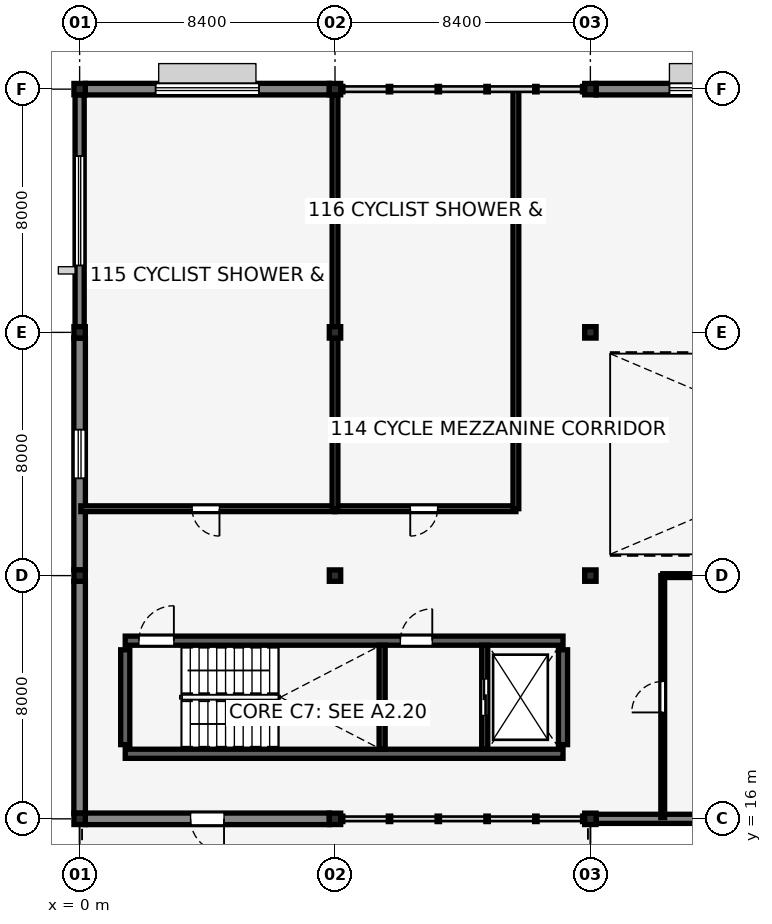
"""IFC4 building model, lengths in metres.
Left out: names, types, materials, properties, quantities, classifications, styles, units other than length and angle.
Written with IfcOpenShell. Run it as: python <this file> out.ifc"""

import sys

from ifc_helpers import new_model, si_unit, direction, frame, frame_2d, origin, origin_2d, place, context, subcontext, project, spatial, rectangle, i_section, extrude, element, fill, save


model = new_model("IFC4")
c1 = context("Model", 3, precision=1e-05, world=origin(), true_north=direction((0.0, 1.0)))
c2 = subcontext(c1, "Body", "Model", "MODEL_VIEW")
j1 = project(units=[si_unit("LENGTHUNIT", "METRE"), si_unit("PLANEANGLEUNIT", "RADIAN")], contexts=[c1])
p1 = place(None, origin())
s1 = spatial("IfcSite", under=j1, at=p1, CompositionType="ELEMENT")
p2 = place(p1, origin())
s2 = spatial("IfcBuilding", under=s1, at=p2, CompositionType="ELEMENT")
p3 = place(p2, frame((0.0, 0.0, 5.44)))
s3 = spatial("IfcBuildingStorey", under=s2, at=p3, CompositionType="ELEMENT", Elevation=5.44)
p4 = place(p3, frame((1.5, 18.14, 0.0), z_axis=(0.0, 0.0, 1.0), x_axis=(1.0, 0.0, 0.0)))
e1 = element("IfcWall", 1, at=p4, inside=s3, PredefinedType="SHEAR", context=c2, shape_type="SweptSolid", body=[
    extrude(rectangle(XDim=14.4, YDim=0.3, at=frame_2d((7.2, 0.0))), origin(), (0.0, 0.0, 1.0), 3.8),
])
p5 = place(p3, frame((1.5, 21.86, 0.0), z_axis=(0.0, 0.0, 1.0), x_axis=(1.0, 0.0, 0.0)))
e2 = element("IfcWall", 2, at=p5, inside=s3, PredefinedType="SHEAR", context=c2, shape_type="SweptSolid", body=[
    extrude(rectangle(XDim=14.4, YDim=0.3, at=frame_2d((7.2, 0.0))), origin(), (0.0, 0.0, 1.0), 3.8),
])
p6 = place(p5, frame((0.45, 0.0, 0.0), z_axis=(0.0, 0.0, 1.0), x_axis=(1.0, 0.0, 0.0)))
e3 = element("IfcOpeningElement", 3, at=p6, cuts=e2, PredefinedType="OPENING", context=c2, shape_type="SweptSolid", body=[
    extrude(rectangle(XDim=1.15, YDim=2.15, at=frame_2d((0.575, 1.075))), frame((0.0, 0.16, 0.0), z_axis=(0.0, -1.0, 0.0), x_axis=(1.0, 0.0, 0.0)), (0.0, 0.0, 1.0), 0.32),
])
p7 = place(p5, frame((9.05, 0.0, 0.0), z_axis=(0.0, 0.0, 1.0), x_axis=(1.0, 0.0, 0.0)))
e4 = element("IfcOpeningElement", 4, at=p7, cuts=e2, PredefinedType="OPENING", context=c2, shape_type="SweptSolid", body=[
    extrude(rectangle(XDim=1.05, YDim=2.15, at=frame_2d((0.525, 1.075))), frame((0.0, 0.16, 0.0), z_axis=(0.0, -1.0, 0.0), x_axis=(1.0, 0.0, 0.0)), (0.0, 0.0, 1.0), 0.32),
])
for number, where, z_axis, x_axis in (
    (5, (1.5, 18.44, 0.0), (0.0, 0.0, 1.0), (0.0, 1.0, 0.0)),
    (6, (15.9, 18.44, 0.0), (0.0, 0.0, 1.0), (0.0, 1.0, 0.0)),
):
    element("IfcWall", number, at=place(p3, frame(where, z_axis=z_axis, x_axis=x_axis)), inside=s3, PredefinedType="SHEAR", context=c2, shape_type="SweptSolid", body=[
        extrude(rectangle(XDim=3.12, YDim=0.3, at=frame_2d((1.56, 0.0))), origin(), (0.0, 0.0, 1.0), 3.8),
    ])
for number, where, z_axis, x_axis in (
    (7, (0.0, 16.0, 0.0), (0.0, 0.0, 1.0), (1.0, 0.0, 0.0)),
    (8, (0.0, 24.0, 0.0), (0.0, 0.0, 1.0), (1.0, 0.0, 0.0)),
    (9, (0.0, 32.0, 0.0), (0.0, 0.0, 1.0), (1.0, 0.0, 0.0)),
    (10, (0.0, 40.0, 0.0), (0.0, 0.0, 1.0), (1.0, 0.0, 0.0)),
    (11, (8.4, 16.0, 0.0), (0.0, 0.0, 1.0), (1.0, 0.0, 0.0)),
    (12, (8.4, 24.0, 0.0), (0.0, 0.0, 1.0), (1.0, 0.0, 0.0)),
    (13, (8.4, 32.0, 0.0), (0.0, 0.0, 1.0), (1.0, 0.0, 0.0)),
    (14, (8.4, 40.0, 0.0), (0.0, 0.0, 1.0), (1.0, 0.0, 0.0)),
    (15, (16.8, 16.0, 0.0), (0.0, 0.0, 1.0), (1.0, 0.0, 0.0)),
    (16, (16.8, 24.0, 0.0), (0.0, 0.0, 1.0), (1.0, 0.0, 0.0)),
    (17, (16.8, 32.0, 0.0), (0.0, 0.0, 1.0), (1.0, 0.0, 0.0)),
    (18, (16.8, 40.0, 0.0), (0.0, 0.0, 1.0), (1.0, 0.0, 0.0)),
):
    element("IfcColumn", number, at=place(p3, frame(where, z_axis=z_axis, x_axis=x_axis)), inside=s3, PredefinedType="COLUMN", context=c2, shape_type="SweptSolid", body=[
        extrude(i_section(OverallWidth=0.375, OverallDepth=0.375, WebThickness=0.017, FlangeThickness=0.027, FilletRadius=0.015, at=origin_2d()), origin(), (0.0, 0.0, 1.0), 3.8),
    ])
p8 = place(p3, frame((0.187, 16.0, 0.0), z_axis=(0.0, 0.0, 1.0), x_axis=(1.0, 0.0, 0.0)))
e19 = element("IfcWall", 19, at=p8, inside=s3, PredefinedType="SOLIDWALL", context=c2, shape_type="SweptSolid", body=[
    extrude(rectangle(XDim=8.025, YDim=0.38, at=frame_2d((4.013, 0.0))), origin(), (0.0, 0.0, 1.0), 3.45),
])
p9 = place(p8, frame((4.563, 0.0, 0.0), z_axis=(0.0, 0.0, 1.0), x_axis=(-1.0, 0.0, 0.0)))
e20 = element("IfcOpeningElement", 20, at=p9, cuts=e19, PredefinedType="OPENING", context=c2, shape_type="SweptSolid", body=[
    extrude(rectangle(XDim=1.1, YDim=2.15, at=frame_2d((0.55, 1.075))), frame((0.0, 0.2, 0.0), z_axis=(0.0, -1.0, 0.0), x_axis=(1.0, 0.0, 0.0)), (0.0, 0.0, 1.0), 0.4),
])
p10 = place(p3, frame((16.987, 16.0, 0.0), z_axis=(0.0, 0.0, 1.0), x_axis=(1.0, 0.0, 0.0)))
e21 = element("IfcWall", 21, at=p10, inside=s3, PredefinedType="SOLIDWALL", context=c2, shape_type="SweptSolid", body=[
    extrude(rectangle(XDim=8.025, YDim=0.3, at=frame_2d((4.013, 0.0))), origin(), (0.0, 0.0, 1.0), 3.45),
])
p11 = place(p10, frame((3.613, 0.0, 0.65), z_axis=(0.0, 0.0, 1.0), x_axis=(1.0, 0.0, 0.0)))
e22 = element("IfcOpeningElement", 22, at=p11, cuts=e21, PredefinedType="OPENING", context=c2, shape_type="SweptSolid", body=[
    extrude(rectangle(XDim=0.8, YDim=1.85, at=frame_2d((0.4, 0.925))), frame((0.0, 0.16, 0.0), z_axis=(0.0, -1.0, 0.0), x_axis=(1.0, 0.0, 0.0)), (0.0, 0.0, 1.0), 0.32),
])
p12 = place(p3, frame((0.0, 16.187, 0.0), z_axis=(0.0, 0.0, 1.0), x_axis=(0.0, 1.0, 0.0)))
e23 = element("IfcWall", 23, at=p12, inside=s3, PredefinedType="SOLIDWALL", context=c2, shape_type="SweptSolid", body=[
    extrude(rectangle(XDim=7.625, YDim=0.38, at=frame_2d((3.813, 0.0))), origin(), (0.0, 0.0, 1.0), 3.5),
])
p13 = place(p3, frame((0.0, 24.187, 0.0), z_axis=(0.0, 0.0, 1.0), x_axis=(0.0, 1.0, 0.0)))
e24 = element("IfcWall", 24, at=p13, inside=s3, PredefinedType="SOLIDWALL", context=c2, shape_type="SweptSolid", body=[
    extrude(rectangle(XDim=7.625, YDim=0.38, at=frame_2d((3.813, 0.0))), origin(), (0.0, 0.0, 1.0), 3.442),
])
p14 = place(p13, frame((3.013, 0.0, 0.9), z_axis=(0.0, 0.0, 1.0), x_axis=(1.0, 0.0, 0.0)))
e25 = element("IfcOpeningElement", 25, at=p14, cuts=e24, PredefinedType="OPENING", context=c2, shape_type="SweptSolid", body=[
    extrude(rectangle(XDim=1.6, YDim=1.2, at=frame_2d((0.8, 0.6))), frame((0.0, 0.2, 0.0), z_axis=(0.0, -1.0, 0.0), x_axis=(1.0, 0.0, 0.0)), (0.0, 0.0, 1.0), 0.4),
])
p15 = place(p3, frame((0.0, 32.187, 0.0), z_axis=(0.0, 0.0, 1.0), x_axis=(0.0, 1.0, 0.0)))
e26 = element("IfcWall", 26, at=p15, inside=s3, PredefinedType="SOLIDWALL", context=c2, shape_type="SweptSolid", body=[
    extrude(rectangle(XDim=7.625, YDim=0.3, at=frame_2d((3.813, 0.0))), origin(), (0.0, 0.0, 1.0), 3.442),
])
p16 = place(p15, frame((2.013, 0.0, 0.9), z_axis=(0.0, 0.0, 1.0), x_axis=(1.0, 0.0, 0.0)))
e27 = element("IfcOpeningElement", 27, at=p16, cuts=e26, PredefinedType="OPENING", context=c2, shape_type="SweptSolid", body=[
    extrude(rectangle(XDim=3.6, YDim=1.8, at=frame_2d((1.8, 0.9))), frame((0.0, 0.16, 0.0), z_axis=(0.0, -1.0, 0.0), x_axis=(1.0, 0.0, 0.0)), (0.0, 0.0, 1.0), 0.32),
])
p17 = place(p3, frame((0.187, 40.0, 0.0), z_axis=(0.0, 0.0, 1.0), x_axis=(1.0, 0.0, 0.0)))
e28 = element("IfcWall", 28, at=p17, inside=s3, PredefinedType="SOLIDWALL", context=c2, shape_type="SweptSolid", body=[
    extrude(rectangle(XDim=8.025, YDim=0.38, at=frame_2d((4.013, 0.0))), origin(), (0.0, 0.0, 1.0), 3.45),
])
p18 = place(p17, frame((2.313, 0.0, 0.9), z_axis=(0.0, 0.0, 1.0), x_axis=(1.0, 0.0, 0.0)))
e29 = element("IfcOpeningElement", 29, at=p18, cuts=e28, PredefinedType="OPENING", context=c2, shape_type="SweptSolid", body=[
    extrude(rectangle(XDim=3.4, YDim=1.7, at=frame_2d((1.7, 0.85))), frame((0.0, 0.2, 0.0), z_axis=(0.0, -1.0, 0.0), x_axis=(1.0, 0.0, 0.0)), (0.0, 0.0, 1.0), 0.4),
])
p19 = place(p3, frame((16.987, 40.0, 0.0), z_axis=(0.0, 0.0, 1.0), x_axis=(1.0, 0.0, 0.0)))
e30 = element("IfcWall", 30, at=p19, inside=s3, PredefinedType="SOLIDWALL", context=c2, shape_type="SweptSolid", body=[
    extrude(rectangle(XDim=8.025, YDim=0.38, at=frame_2d((4.013, 0.0))), origin(), (0.0, 0.0, 1.0), 3.45),
])
p20 = place(p19, frame((2.413, 0.0, 0.9), z_axis=(0.0, 0.0, 1.0), x_axis=(1.0, 0.0, 0.0)))
e31 = element("IfcOpeningElement", 31, at=p20, cuts=e30, PredefinedType="OPENING", context=c2, shape_type="SweptSolid", body=[
    extrude(rectangle(XDim=3.2, YDim=1.65, at=frame_2d((1.6, 0.825))), frame((0.0, 0.2, 0.0), z_axis=(0.0, -1.0, 0.0), x_axis=(1.0, 0.0, 0.0)), (0.0, 0.0, 1.0), 0.4),
])
p21 = place(p3, frame((9.95, 18.29, 0.0), z_axis=(0.0, 0.0, 1.0), x_axis=(0.0, 1.0, 0.0)))
e32 = element("IfcWall", 32, at=p21, inside=s3, PredefinedType="SHEAR", context=c2, shape_type="SweptSolid", body=[
    extrude(rectangle(XDim=3.42, YDim=0.2, at=frame_2d((1.71, 0.0))), origin(), (0.0, 0.0, 1.0), 3.8),
])
p22 = place(p3, frame((13.325, 18.29, 0.0), z_axis=(0.0, 0.0, 1.0), x_axis=(0.0, 1.0, 0.0)))
e33 = element("IfcWall", 33, at=p22, inside=s3, PredefinedType="SHEAR", context=c2, shape_type="SweptSolid", body=[
    extrude(rectangle(XDim=3.42, YDim=0.2, at=frame_2d((1.71, 0.0))), origin(), (0.0, 0.0, 1.0), 3.8),
])
p23 = place(p22, frame((1.11, 0.0, 0.0), z_axis=(0.0, 0.0, 1.0), x_axis=(1.0, 0.0, 0.0)))
e34 = element("IfcOpeningElement", 34, at=p23, cuts=e33, PredefinedType="OPENING", context=c2, shape_type="SweptSolid", body=[
    extrude(rectangle(XDim=1.2, YDim=2.2, at=frame_2d((0.6, 1.1))), frame((0.0, 0.11, 0.0), z_axis=(0.0, -1.0, 0.0), x_axis=(1.0, 0.0, 0.0)), (0.0, 0.0, 1.0), 0.22),
])
p24 = place(p3, frame((0.04, 26.2, 0.0), z_axis=(0.0, 0.0, 1.0), x_axis=(1.0, 0.0, 0.0)))
e35 = element("IfcWall", 35, at=p24, inside=s3, PredefinedType="PLUMBINGWALL", context=c2, shape_type="SweptSolid", body=[
    extrude(rectangle(XDim=8.36, YDim=0.19, at=frame_2d((4.18, 0.0))), origin(), (0.0, 0.0, 1.0), 3.8),
])
p25 = place(p24, frame((4.56, 0.0, 0.0), z_axis=(0.0, 0.0, 1.0), x_axis=(-1.0, 0.0, 0.0)))
e36 = element("IfcOpeningElement", 36, at=p25, cuts=e35, PredefinedType="OPENING", context=c2, shape_type="SweptSolid", body=[
    extrude(rectangle(XDim=0.9, YDim=2.15, at=frame_2d((0.45, 1.075))), frame((0.0, 0.105, 0.0), z_axis=(0.0, -1.0, 0.0), x_axis=(1.0, 0.0, 0.0)), (0.0, 0.0, 1.0), 0.21),
])
p26 = place(p3, frame((8.4, 26.2, 0.0), z_axis=(0.0, 0.0, 1.0), x_axis=(1.0, 0.0, 0.0)))
e37 = element("IfcWall", 37, at=p26, inside=s3, PredefinedType="PLUMBINGWALL", context=c2, shape_type="SweptSolid", body=[
    extrude(rectangle(XDim=5.95, YDim=0.19, at=frame_2d((2.975, 0.0))), origin(), (0.0, 0.0, 1.0), 3.8),
])
p27 = place(p26, frame((3.375, 0.0, 0.0), z_axis=(0.0, 0.0, 1.0), x_axis=(-1.0, 0.0, 0.0)))
e38 = element("IfcOpeningElement", 38, at=p27, cuts=e37, PredefinedType="OPENING", context=c2, shape_type="SweptSolid", body=[
    extrude(rectangle(XDim=0.9, YDim=2.15, at=frame_2d((0.45, 1.075))), frame((0.0, 0.105, 0.0), z_axis=(0.0, -1.0, 0.0), x_axis=(1.0, 0.0, 0.0)), (0.0, 0.0, 1.0), 0.21),
])
p28 = place(p3, frame((19.18, 16.04, 0.0), z_axis=(0.0, 0.0, 1.0), x_axis=(0.0, 1.0, 0.0)))
e39 = element("IfcWall", 39, at=p28, inside=s3, PredefinedType="PARTITIONING", context=c2, shape_type="SweptSolid", body=[
    extrude(rectangle(XDim=7.96, YDim=0.125, at=frame_2d((3.98, 0.0))), origin(), (0.0, 0.0, 1.0), 3.442),
])
p29 = place(p28, frame((3.46, 0.0, 0.0), z_axis=(0.0, 0.0, 1.0), x_axis=(1.0, 0.0, 0.0)))
e40 = element("IfcOpeningElement", 40, at=p29, cuts=e39, PredefinedType="OPENING", context=c2, shape_type="SweptSolid", body=[
    extrude(rectangle(XDim=1.02, YDim=2.16, at=frame_2d((0.51, 1.08))), frame((0.0, 0.073, 0.0), z_axis=(0.0, -1.0, 0.0), x_axis=(1.0, 0.0, 0.0)), (0.0, 0.0, 1.0), 0.145),
])
p30 = place(p3, frame((8.4, 26.2, 0.0), z_axis=(0.0, 0.0, 1.0), x_axis=(0.0, 1.0, 0.0)))
e41 = element("IfcWall", 41, at=p30, inside=s3, PredefinedType="PLUMBINGWALL", context=c2, shape_type="SweptSolid", body=[
    extrude(rectangle(XDim=5.623, YDim=0.19, at=frame_2d((2.812, 0.0))), origin(), (0.0, 0.0, 1.0), 3.337),
])
p31 = place(p3, frame((8.4, 32.177, 0.0), z_axis=(0.0, 0.0, 1.0), x_axis=(0.0, 1.0, 0.0)))
e42 = element("IfcWall", 42, at=p31, inside=s3, PredefinedType="PLUMBINGWALL", context=c2, shape_type="SweptSolid", body=[
    extrude(rectangle(XDim=7.646, YDim=0.19, at=frame_2d((3.823, 0.0))), origin(), (0.0, 0.0, 1.0), 3.337),
])
p32 = place(p3, frame((14.35, 26.2, 0.0), z_axis=(0.0, 0.0, 1.0), x_axis=(0.0, 1.0, 0.0)))
e43 = element("IfcWall", 43, at=p32, inside=s3, PredefinedType="PLUMBINGWALL", context=c2, shape_type="SweptSolid", body=[
    extrude(rectangle(XDim=13.76, YDim=0.19, at=frame_2d((6.88, 0.0))), origin(), (0.0, 0.0, 1.0), 3.442),
])
p33 = place(p3, frame((19.18, 24.0, 0.0), z_axis=(0.0, 0.0, 1.0), x_axis=(1.0, 0.0, 0.0)))
e44 = element("IfcWall", 44, at=p33, inside=s3, PredefinedType="PARTITIONING", context=c2, shape_type="SweptSolid", body=[
    extrude(rectangle(XDim=5.843, YDim=0.125, at=frame_2d((2.921, 0.0))), origin(), (0.0, 0.0, 1.0), 3.26),
])
p34 = place(p9, origin())
e45 = element("IfcDoor", 45, at=p34, inside=s3, OperationType="SINGLE_SWING_LEFT", PredefinedType="DOOR", context=c2, shape_type="SweptSolid", body=[
    extrude(rectangle(XDim=1.1, YDim=2.15, at=frame_2d((0.55, 1.075))), frame((0.0, 0.025, 0.0), z_axis=(0.0, -1.0, 0.0), x_axis=(1.0, 0.0, 0.0)), (0.0, 0.0, 1.0), 0.05),
])
fill(e20, e45)
p35 = place(p14, origin())
e46 = element("IfcWindow", 46, at=p35, inside=s3, PartitioningType="DOUBLE_PANEL_VERTICAL", PredefinedType="WINDOW", context=c2, shape_type="SweptSolid", body=[
    extrude(rectangle(XDim=1.6, YDim=1.2, at=frame_2d((0.8, 0.6))), frame((0.0, 0.03, 0.0), z_axis=(0.0, -1.0, 0.0), x_axis=(1.0, 0.0, 0.0)), (0.0, 0.0, 1.0), 0.06),
])
fill(e25, e46)
p36 = place(p16, origin())
e47 = element("IfcWindow", 47, at=p36, inside=s3, PartitioningType="TRIPLE_PANEL_VERTICAL", PredefinedType="WINDOW", context=c2, shape_type="SweptSolid", body=[
    extrude(rectangle(XDim=3.6, YDim=1.8, at=frame_2d((1.8, 0.9))), frame((0.0, 0.03, 0.0), z_axis=(0.0, -1.0, 0.0), x_axis=(1.0, 0.0, 0.0)), (0.0, 0.0, 1.0), 0.06),
])
fill(e27, e47)
p37 = place(p18, origin())
e48 = element("IfcWindow", 48, at=p37, inside=s3, PartitioningType="TRIPLE_PANEL_VERTICAL", PredefinedType="WINDOW", context=c2, shape_type="SweptSolid", body=[
    extrude(rectangle(XDim=3.4, YDim=1.7, at=frame_2d((1.7, 0.85))), frame((0.0, 0.03, 0.0), z_axis=(0.0, -1.0, 0.0), x_axis=(1.0, 0.0, 0.0)), (0.0, 0.0, 1.0), 0.06),
])
fill(e29, e48)
p38 = place(p20, origin())
e49 = element("IfcWindow", 49, at=p38, inside=s3, PartitioningType="TRIPLE_PANEL_VERTICAL", PredefinedType="WINDOW", context=c2, shape_type="SweptSolid", body=[
    extrude(rectangle(XDim=3.2, YDim=1.65, at=frame_2d((1.6, 0.825))), frame((0.0, 0.03, 0.0), z_axis=(0.0, -1.0, 0.0), x_axis=(1.0, 0.0, 0.0)), (0.0, 0.0, 1.0), 0.06),
])
fill(e31, e49)
p39 = place(p6, origin())
e50 = element("IfcDoor", 50, at=p39, inside=s3, OperationType="SINGLE_SWING_RIGHT", PredefinedType="DOOR", context=c2, shape_type="SweptSolid", body=[
    extrude(rectangle(XDim=1.15, YDim=2.15, at=frame_2d((0.575, 1.075))), frame((0.0, 0.025, 0.0), z_axis=(0.0, -1.0, 0.0), x_axis=(1.0, 0.0, 0.0)), (0.0, 0.0, 1.0), 0.05),
])
fill(e3, e50)
p40 = place(p7, origin())
e51 = element("IfcDoor", 51, at=p40, inside=s3, OperationType="SINGLE_SWING_RIGHT", PredefinedType="DOOR", context=c2, shape_type="SweptSolid", body=[
    extrude(rectangle(XDim=1.05, YDim=2.15, at=frame_2d((0.525, 1.075))), frame((0.0, 0.025, 0.0), z_axis=(0.0, -1.0, 0.0), x_axis=(1.0, 0.0, 0.0)), (0.0, 0.0, 1.0), 0.05),
])
fill(e4, e51)
p41 = place(p23, origin())
e52 = element("IfcDoor", 52, at=p41, inside=s3, OperationType="DOUBLE_DOOR_SLIDING", PredefinedType="DOOR", context=c2, shape_type="SweptSolid", body=[
    extrude(rectangle(XDim=1.2, YDim=2.2, at=frame_2d((0.6, 1.1))), frame((0.0, 0.025, 0.0), z_axis=(0.0, -1.0, 0.0), x_axis=(1.0, 0.0, 0.0)), (0.0, 0.0, 1.0), 0.05),
])
fill(e34, e52)
p42 = place(p25, origin())
e53 = element("IfcDoor", 53, at=p42, inside=s3, OperationType="SINGLE_SWING_LEFT", PredefinedType="DOOR", context=c2, shape_type="SweptSolid", body=[
    extrude(rectangle(XDim=0.9, YDim=2.15, at=frame_2d((0.45, 1.075))), frame((0.0, 0.025, 0.0), z_axis=(0.0, -1.0, 0.0), x_axis=(1.0, 0.0, 0.0)), (0.0, 0.0, 1.0), 0.05),
])
fill(e36, e53)
p43 = place(p27, origin())
e54 = element("IfcDoor", 54, at=p43, inside=s3, OperationType="SINGLE_SWING_RIGHT", PredefinedType="DOOR", context=c2, shape_type="SweptSolid", body=[
    extrude(rectangle(XDim=0.9, YDim=2.15, at=frame_2d((0.45, 1.075))), frame((0.0, 0.025, 0.0), z_axis=(0.0, -1.0, 0.0), x_axis=(1.0, 0.0, 0.0)), (0.0, 0.0, 1.0), 0.05),
])
fill(e38, e54)
p44 = place(p29, origin())
e55 = element("IfcDoor", 55, at=p44, inside=s3, OperationType="SINGLE_SWING_LEFT", PredefinedType="DOOR", context=c2, shape_type="SweptSolid", body=[
    extrude(rectangle(XDim=1.02, YDim=2.16, at=frame_2d((0.51, 1.08))), frame((0.0, 0.025, 0.0), z_axis=(0.0, -1.0, 0.0), x_axis=(1.0, 0.0, 0.0)), (0.0, 0.0, 1.0), 0.05),
])
fill(e40, e55)
save(model, sys.argv[1])
